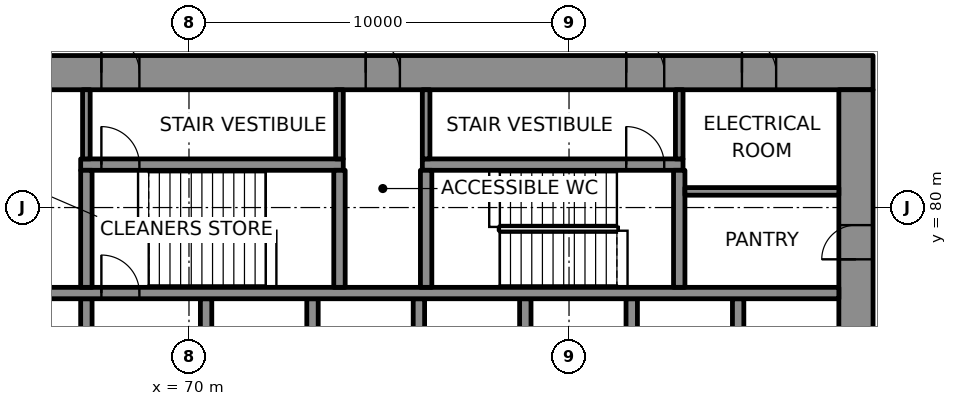
"""IFC4 building model, lengths in metres.
Left out: names, types, materials, properties, quantities, classifications, styles, units other than length and angle.
Written with IfcOpenShell. Run it as: python <this file> out.ifc"""

import sys

from ifc_helpers import new_model, si_unit, direction, frame, frame_2d, origin, place, context, subcontext, project, spatial, rectangle, extrude, element, fill, save


model = new_model("IFC4")
c1 = context("Model", 3, precision=1e-05, world=origin(), true_north=direction((0.0, 1.0)))
c2 = subcontext(c1, "Body", "Model", "MODEL_VIEW")
j1 = project(units=[si_unit("LENGTHUNIT", "METRE"), si_unit("PLANEANGLEUNIT", "RADIAN")], contexts=[c1])
p1 = place(None, origin())
s1 = spatial("IfcSite", under=j1, at=p1, CompositionType="ELEMENT")
p2 = place(p1, origin())
s2 = spatial("IfcBuilding", under=s1, at=p2, CompositionType="ELEMENT")
p3 = place(p2, frame((0.0, 0.0, 124.0)))
s3 = spatial("IfcBuildingStorey", under=s2, at=p3, CompositionType="ELEMENT", Elevation=124.0)
p4 = place(p3, frame((62.0, 83.55, 0.0), z_axis=(0.0, 0.0, 1.0), x_axis=(1.0, 0.0, 0.0)))
e1 = element("IfcWall", 1, at=p4, inside=s3, PredefinedType="SHEAR", context=c2, shape_type="SweptSolid", body=[
    extrude(rectangle(XDim=26.0, YDim=0.9, at=frame_2d((13.0, 0.0))), origin(), (0.0, 0.0, 1.0), 4.0),
])
p5 = place(p4, frame((5.695, 0.0, 0.0)))
e2 = element("IfcOpeningElement", 2, at=p5, cuts=e1, PredefinedType="OPENING", context=c2, shape_type="SweptSolid", body=[
    extrude(rectangle(XDim=1.0, YDim=2.1, at=frame_2d((0.5, 1.05))), frame((0.0, 0.46, 0.0), z_axis=(0.0, -1.0, 0.0), x_axis=(1.0, 0.0, 0.0)), (0.0, 0.0, 1.0), 0.92),
])
p6 = place(p4, frame((19.505, 0.0, 0.0)))
e3 = element("IfcOpeningElement", 3, at=p6, cuts=e1, PredefinedType="OPENING", context=c2, shape_type="SweptSolid", body=[
    extrude(rectangle(XDim=1.0, YDim=2.1, at=frame_2d((0.5, 1.05))), frame((0.0, 0.46, 0.0), z_axis=(0.0, -1.0, 0.0), x_axis=(1.0, 0.0, 0.0)), (0.0, 0.0, 1.0), 0.92),
])
p7 = place(p4, frame((3.45, 0.0, 0.0)))
e4 = element("IfcOpeningElement", 4, at=p7, cuts=e1, PredefinedType="OPENING", context=c2, shape_type="SweptSolid", body=[
    extrude(rectangle(XDim=0.9, YDim=2.1, at=frame_2d((0.45, 1.05))), frame((0.0, 0.46, 0.0), z_axis=(0.0, -1.0, 0.0), x_axis=(1.0, 0.0, 0.0)), (0.0, 0.0, 1.0), 0.92),
])
p8 = place(p4, frame((12.65, 0.0, 0.0)))
e5 = element("IfcOpeningElement", 5, at=p8, cuts=e1, PredefinedType="OPENING", context=c2, shape_type="SweptSolid", body=[
    extrude(rectangle(XDim=0.9, YDim=2.1, at=frame_2d((0.45, 1.05))), frame((0.0, 0.46, 0.0), z_axis=(0.0, -1.0, 0.0), x_axis=(1.0, 0.0, 0.0)), (0.0, 0.0, 1.0), 0.92),
])
p9 = place(p4, frame((22.55, 0.0, 0.0)))
e6 = element("IfcOpeningElement", 6, at=p9, cuts=e1, PredefinedType="OPENING", context=c2, shape_type="SweptSolid", body=[
    extrude(rectangle(XDim=0.9, YDim=2.1, at=frame_2d((0.45, 1.05))), frame((0.0, 0.46, 0.0), z_axis=(0.0, -1.0, 0.0), x_axis=(1.0, 0.0, 0.0)), (0.0, 0.0, 1.0), 0.92),
])
p10 = place(p3, frame((87.55, 66.9, 0.0), z_axis=(0.0, 0.0, 1.0), x_axis=(0.0, 1.0, 0.0)))
e7 = element("IfcWall", 7, at=p10, inside=s3, PredefinedType="SHEAR", context=c2, shape_type="SweptSolid", body=[
    extrude(rectangle(XDim=16.2, YDim=0.9, at=frame_2d((8.1, 0.0))), origin(), (0.0, 0.0, 1.0), 4.0),
])
p11 = place(p10, frame((5.5, 0.0, 0.0)))
e8 = element("IfcOpeningElement", 8, at=p11, cuts=e7, PredefinedType="OPENING", context=c2, shape_type="SweptSolid", body=[
    extrude(rectangle(XDim=1.8, YDim=2.1, at=frame_2d((0.9, 1.05))), frame((0.0, 0.46, 0.0), z_axis=(0.0, -1.0, 0.0), x_axis=(1.0, 0.0, 0.0)), (0.0, 0.0, 1.0), 0.92),
])
p12 = place(p10, frame((11.738, 0.0, 0.0)))
e9 = element("IfcOpeningElement", 9, at=p12, cuts=e7, PredefinedType="OPENING", context=c2, shape_type="SweptSolid", body=[
    extrude(rectangle(XDim=0.9, YDim=2.1, at=frame_2d((0.45, 1.05))), frame((0.0, 0.46, 0.0), z_axis=(0.0, -1.0, 0.0), x_axis=(1.0, 0.0, 0.0)), (0.0, 0.0, 1.0), 0.92),
])
p13 = place(p3, frame((67.3, 75.0, 0.0), z_axis=(0.0, 0.0, 1.0), x_axis=(0.0, 1.0, 0.0)))
e10 = element("IfcWall", 10, at=p13, inside=s3, PredefinedType="SHEAR", context=c2, shape_type="SweptSolid", body=[
    extrude(rectangle(XDim=2.6, YDim=0.3, at=frame_2d((1.3, 0.0))), origin(), (0.0, 0.0, 1.0), 4.0),
])
p14 = place(p3, frame((70.45, 75.0, 0.0), z_axis=(0.0, 0.0, 1.0), x_axis=(0.0, 1.0, 0.0)))
e11 = element("IfcWall", 11, at=p14, inside=s3, PredefinedType="SHEAR", context=c2, shape_type="SweptSolid", body=[
    extrude(rectangle(XDim=2.6, YDim=0.3, at=frame_2d((1.3, 0.0))), origin(), (0.0, 0.0, 1.0), 4.0),
])
p15 = place(p14, frame((0.15, 0.0, 0.0)))
e12 = element("IfcOpeningElement", 12, at=p15, cuts=e11, PredefinedType="OPENING", context=c2, shape_type="SweptSolid", body=[
    extrude(rectangle(XDim=1.1, YDim=2.1, at=frame_2d((0.55, 1.05))), frame((0.0, 0.16, 0.0), z_axis=(0.0, -1.0, 0.0), x_axis=(1.0, 0.0, 0.0)), (0.0, 0.0, 1.0), 0.32),
])
for number, where, z_axis, x_axis in (
    (13, (73.25, 75.0, 0.0), (0.0, 0.0, 1.0), (0.0, 1.0, 0.0)),
    (14, (76.05, 75.0, 0.0), (0.0, 0.0, 1.0), (0.0, 1.0, 0.0)),
    (15, (78.85, 75.0, 0.0), (0.0, 0.0, 1.0), (0.0, 1.0, 0.0)),
    (16, (81.65, 75.0, 0.0), (0.0, 0.0, 1.0), (0.0, 1.0, 0.0)),
    (17, (84.45, 75.0, 0.0), (0.0, 0.0, 1.0), (0.0, 1.0, 0.0)),
):
    element("IfcWall", number, at=place(p3, frame(where, z_axis=z_axis, x_axis=x_axis)), inside=s3, PredefinedType="SHEAR", context=c2, shape_type="SweptSolid", body=[
        extrude(rectangle(XDim=2.6, YDim=0.3, at=frame_2d((1.3, 0.0))), origin(), (0.0, 0.0, 1.0), 4.0),
    ])
p16 = place(p3, frame((64.35, 77.75, 0.0), z_axis=(0.0, 0.0, 1.0), x_axis=(1.0, 0.0, 0.0)))
e18 = element("IfcWall", 18, at=p16, inside=s3, PredefinedType="SHEAR", context=c2, shape_type="SweptSolid", body=[
    extrude(rectangle(XDim=22.75, YDim=0.3, at=frame_2d((11.375, 0.0))), origin(), (0.0, 0.0, 1.0), 4.0),
])
p17 = place(p16, frame((3.345, 0.0, 0.0)))
e19 = element("IfcOpeningElement", 19, at=p17, cuts=e18, PredefinedType="OPENING", context=c2, shape_type="SweptSolid", body=[
    extrude(rectangle(XDim=1.0, YDim=2.1, at=frame_2d((0.5, 1.05))), frame((0.0, 0.16, 0.0), z_axis=(0.0, -1.0, 0.0), x_axis=(1.0, 0.0, 0.0)), (0.0, 0.0, 1.0), 0.32),
])
p18 = place(p3, frame((67.15, 81.13, 0.0), z_axis=(0.0, 0.0, 1.0), x_axis=(1.0, 0.0, 0.0)))
e20 = element("IfcWall", 20, at=p18, inside=s3, PredefinedType="SHEAR", context=c2, shape_type="SweptSolid", body=[
    extrude(rectangle(XDim=6.91, YDim=0.3, at=frame_2d((3.455, 0.0))), origin(), (0.0, 0.0, 1.0), 4.0),
])
p19 = place(p18, frame((0.545, 0.0, 0.0)))
e21 = element("IfcOpeningElement", 21, at=p19, cuts=e20, PredefinedType="OPENING", context=c2, shape_type="SweptSolid", body=[
    extrude(rectangle(XDim=1.0, YDim=2.1, at=frame_2d((0.5, 1.05))), frame((0.0, 0.16, 0.0), z_axis=(0.0, -1.0, 0.0), x_axis=(1.0, 0.0, 0.0)), (0.0, 0.0, 1.0), 0.32),
])
p20 = place(p3, frame((76.14, 81.13, 0.0), z_axis=(0.0, 0.0, 1.0), x_axis=(1.0, 0.0, 0.0)))
e22 = element("IfcWall", 22, at=p20, inside=s3, PredefinedType="SHEAR", context=c2, shape_type="SweptSolid", body=[
    extrude(rectangle(XDim=6.86, YDim=0.3, at=frame_2d((3.43, 0.0))), origin(), (0.0, 0.0, 1.0), 4.0),
])
p21 = place(p20, frame((5.365, 0.0, 0.0)))
e23 = element("IfcOpeningElement", 23, at=p21, cuts=e22, PredefinedType="OPENING", context=c2, shape_type="SweptSolid", body=[
    extrude(rectangle(XDim=1.0, YDim=2.1, at=frame_2d((0.5, 1.05))), frame((0.0, 0.16, 0.0), z_axis=(0.0, -1.0, 0.0), x_axis=(1.0, 0.0, 0.0)), (0.0, 0.0, 1.0), 0.32),
])
for number, where, z_axis, x_axis in (
    (24, (67.3, 77.9, 0.0), (0.0, 0.0, 1.0), (0.0, 1.0, 0.0)),
    (25, (73.96, 77.9, 0.0), (0.0, 0.0, 1.0), (0.0, 1.0, 0.0)),
    (26, (76.24, 77.9, 0.0), (0.0, 0.0, 1.0), (0.0, 1.0, 0.0)),
    (27, (82.9, 77.9, 0.0), (0.0, 0.0, 1.0), (0.0, 1.0, 0.0)),
):
    element("IfcWall", number, at=place(p3, frame(where, z_axis=z_axis, x_axis=x_axis)), inside=s3, PredefinedType="SHEAR", context=c2, shape_type="SweptSolid", body=[
        extrude(rectangle(XDim=3.08, YDim=0.3, at=frame_2d((1.54, 0.0))), origin(), (0.0, 0.0, 1.0), 4.0),
    ])
p22 = place(p3, frame((83.05, 80.425, 0.0), z_axis=(0.0, 0.0, 1.0), x_axis=(1.0, 0.0, 0.0)))
e28 = element("IfcWall", 28, at=p22, inside=s3, PredefinedType="PARTITIONING", context=c2, shape_type="SweptSolid", body=[
    extrude(rectangle(XDim=4.05, YDim=0.2, at=frame_2d((2.025, 0.0))), origin(), (0.0, 0.0, 1.0), 4.0),
])
for number, where, z_axis, x_axis in (
    (29, (67.3, 81.28, 0.0), (0.0, 0.0, 1.0), (0.0, 1.0, 0.0)),
    (30, (73.96, 81.28, 0.0), (0.0, 0.0, 1.0), (0.0, 1.0, 0.0)),
    (31, (76.24, 81.28, 0.0), (0.0, 0.0, 1.0), (0.0, 1.0, 0.0)),
    (32, (82.9, 81.28, 0.0), (0.0, 0.0, 1.0), (0.0, 1.0, 0.0)),
):
    element("IfcWall", number, at=place(p3, frame(where, z_axis=z_axis, x_axis=x_axis)), inside=s3, PredefinedType="PARTITIONING", context=c2, shape_type="SweptSolid", body=[
        extrude(rectangle(XDim=1.82, YDim=0.2, at=frame_2d((0.91, 0.0))), origin(), (0.0, 0.0, 1.0), 4.0),
    ])
p23 = place(p17, origin())
e33 = element("IfcDoor", 33, at=p23, inside=s3, OperationType="SINGLE_SWING_LEFT", PredefinedType="DOOR", context=c2, shape_type="SweptSolid", body=[
    extrude(rectangle(XDim=1.0, YDim=2.1, at=frame_2d((0.5, 1.05))), frame((0.0, 0.025, 0.0), z_axis=(0.0, -1.0, 0.0), x_axis=(1.0, 0.0, 0.0)), (0.0, 0.0, 1.0), 0.05),
])
fill(e19, e33)
p24 = place(p19, origin())
e34 = element("IfcDoor", 34, at=p24, inside=s3, OperationType="SINGLE_SWING_RIGHT", PredefinedType="DOOR", context=c2, shape_type="SweptSolid", body=[
    extrude(rectangle(XDim=1.0, YDim=2.1, at=frame_2d((0.5, 1.05))), frame((0.0, 0.025, 0.0), z_axis=(0.0, -1.0, 0.0), x_axis=(1.0, 0.0, 0.0)), (0.0, 0.0, 1.0), 0.05),
])
fill(e21, e34)
p25 = place(p5, origin())
e35 = element("IfcDoor", 35, at=p25, inside=s3, OperationType="SINGLE_SWING_LEFT", PredefinedType="DOOR", context=c2, shape_type="SweptSolid", body=[
    extrude(rectangle(XDim=1.0, YDim=2.1, at=frame_2d((0.5, 1.05))), frame((0.0, 0.17, 0.0), z_axis=(0.0, -1.0, 0.0), x_axis=(1.0, 0.0, 0.0)), (0.0, 0.0, 1.0), 0.34),
])
fill(e2, e35)
p26 = place(p21, origin())
e36 = element("IfcDoor", 36, at=p26, inside=s3, OperationType="SINGLE_SWING_RIGHT", PredefinedType="DOOR", context=c2, shape_type="SweptSolid", body=[
    extrude(rectangle(XDim=1.0, YDim=2.1, at=frame_2d((0.5, 1.05))), frame((0.0, 0.025, 0.0), z_axis=(0.0, -1.0, 0.0), x_axis=(1.0, 0.0, 0.0)), (0.0, 0.0, 1.0), 0.05),
])
fill(e23, e36)
p27 = place(p6, origin())
e37 = element("IfcDoor", 37, at=p27, inside=s3, OperationType="SINGLE_SWING_LEFT", PredefinedType="DOOR", context=c2, shape_type="SweptSolid", body=[
    extrude(rectangle(XDim=1.0, YDim=2.1, at=frame_2d((0.5, 1.05))), frame((0.0, 0.17, 0.0), z_axis=(0.0, -1.0, 0.0), x_axis=(1.0, 0.0, 0.0)), (0.0, 0.0, 1.0), 0.34),
])
fill(e3, e37)
p28 = place(p8, origin())
e38 = element("IfcDoor", 38, at=p28, inside=s3, OperationType="SINGLE_SWING_LEFT", PredefinedType="DOOR", context=c2, shape_type="SweptSolid", body=[
    extrude(rectangle(XDim=0.9, YDim=2.1, at=frame_2d((0.45, 1.05))), frame((0.0, 0.17, 0.0), z_axis=(0.0, -1.0, 0.0), x_axis=(1.0, 0.0, 0.0)), (0.0, 0.0, 1.0), 0.34),
])
fill(e5, e38)
p29 = place(p12, origin())
e39 = element("IfcDoor", 39, at=p29, inside=s3, OperationType="SINGLE_SWING_RIGHT", PredefinedType="DOOR", context=c2, shape_type="SweptSolid", body=[
    extrude(rectangle(XDim=0.9, YDim=2.1, at=frame_2d((0.45, 1.05))), frame((0.0, 0.17, 0.0), z_axis=(0.0, -1.0, 0.0), x_axis=(1.0, 0.0, 0.0)), (0.0, 0.0, 1.0), 0.34),
])
fill(e9, e39)
p30 = place(p9, origin())
e40 = element("IfcDoor", 40, at=p30, inside=s3, OperationType="SINGLE_SWING_LEFT", PredefinedType="DOOR", context=c2, shape_type="SweptSolid", body=[
    extrude(rectangle(XDim=0.9, YDim=2.1, at=frame_2d((0.45, 1.05))), frame((0.0, 0.17, 0.0), z_axis=(0.0, -1.0, 0.0), x_axis=(1.0, 0.0, 0.0)), (0.0, 0.0, 1.0), 0.34),
])
fill(e6, e40)
save(model, sys.argv[1])
